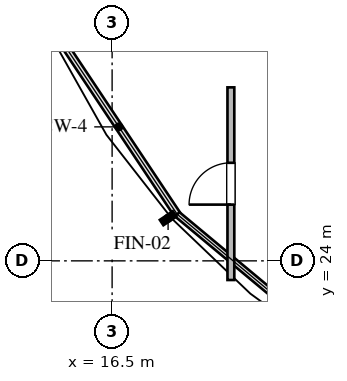
"""IFC4 building model, lengths in metres.
Left out: names, types, materials, properties, quantities, classifications, styles, units other than length and angle.
Written with IfcOpenShell. Run it as: python <this file> out.ifc"""

import sys

from ifc_helpers import new_model, si_unit, direction, frame, frame_2d, origin, place, context, subcontext, project, spatial, rectangle, extrude, element, fill, save


model = new_model("IFC4")
c1 = context("Model", 3, precision=1e-05, world=origin(), true_north=direction((0.0, 1.0)))
c2 = subcontext(c1, "Body", "Model", "MODEL_VIEW")
j1 = project(units=[si_unit("LENGTHUNIT", "METRE"), si_unit("PLANEANGLEUNIT", "RADIAN")], contexts=[c1])
p1 = place(None, origin())
s1 = spatial("IfcSite", under=j1, at=p1, CompositionType="ELEMENT")
p2 = place(p1, origin())
s2 = spatial("IfcBuilding", under=s1, at=p2, CompositionType="ELEMENT")
p3 = place(p2, frame((0.0, 0.0, 238.8)))
s3 = spatial("IfcBuildingStorey", under=s2, at=p3, CompositionType="ELEMENT", Elevation=238.8)
p4 = place(p3, frame((19.625, 23.496, 0.0), z_axis=(0.0, 0.0, 1.0), x_axis=(0.0, 1.0, 0.0)))
e1 = element("IfcWall", 1, at=p4, inside=s3, PredefinedType="PARTITIONING", context=c2, shape_type="SweptSolid", body=[
    extrude(rectangle(XDim=5.069, YDim=0.18, at=frame_2d((2.534, 0.0))), origin(), (0.0, 0.0, 1.0), 2.817),
])
p5 = place(p4, frame((1.984, 0.0, 0.0)))
e2 = element("IfcOpeningElement", 2, at=p5, cuts=e1, PredefinedType="OPENING", context=c2, shape_type="SweptSolid", body=[
    extrude(rectangle(XDim=1.1, YDim=2.1, at=frame_2d((0.55, 1.05))), frame((0.0, 0.1, 0.0), z_axis=(0.0, -1.0, 0.0), x_axis=(1.0, 0.0, 0.0)), (0.0, 0.0, 1.0), 0.2),
])
p6 = place(p5, origin())
e3 = element("IfcDoor", 3, at=p6, inside=s3, OperationType="SINGLE_SWING_LEFT", PredefinedType="DOOR", context=c2, shape_type="SweptSolid", body=[
    extrude(rectangle(XDim=1.1, YDim=2.1, at=frame_2d((0.55, 1.05))), frame((0.0, 0.025, 0.0), z_axis=(0.0, -1.0, 0.0), x_axis=(1.0, 0.0, 0.0)), (0.0, 0.0, 1.0), 0.05),
])
fill(e2, e3)
save(model, sys.argv[1])
